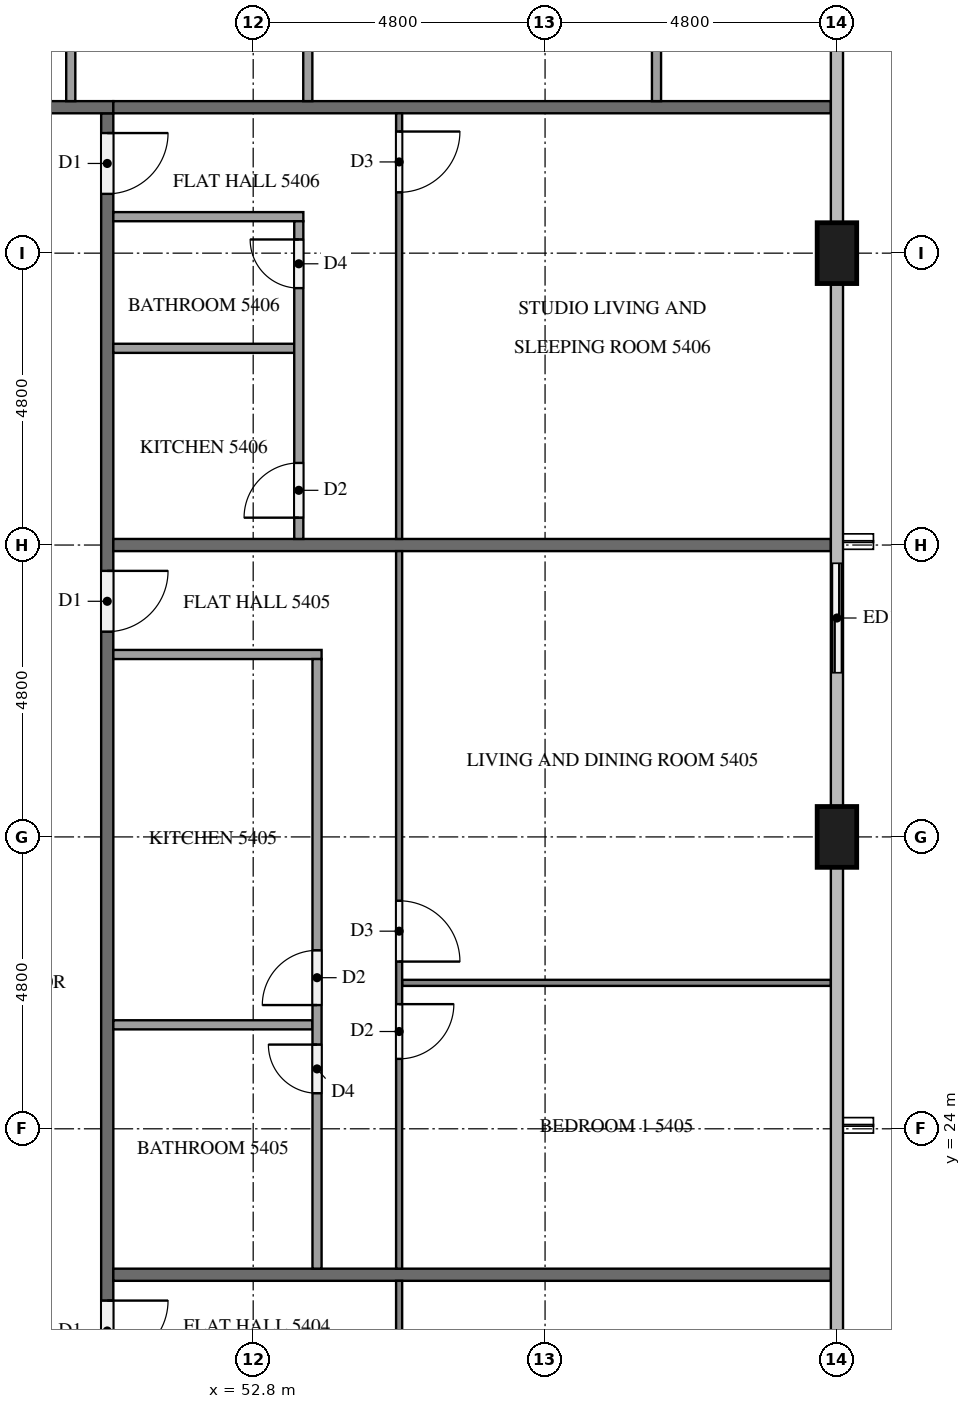
"""IFC4 building model, lengths in metres.
Left out: names, types, materials, properties, quantities, classifications, styles, units other than length and angle.
Written with IfcOpenShell. Run it as: python <this file> out.ifc"""

import sys

from ifc_helpers import new_model, si_unit, direction, frame, frame_2d, origin, origin_2d, place, context, subcontext, project, spatial, rectangle, extrude, element, fill, save


model = new_model("IFC4")
c1 = context("Model", 3, precision=1e-05, world=origin(), true_north=direction((0.0, 1.0)))
c2 = subcontext(c1, "Body", "Model", "MODEL_VIEW")
j1 = project(units=[si_unit("LENGTHUNIT", "METRE"), si_unit("PLANEANGLEUNIT", "RADIAN")], contexts=[c1])
p1 = place(None, origin())
s1 = spatial("IfcSite", under=j1, at=p1, CompositionType="ELEMENT")
p2 = place(p1, origin())
s2 = spatial("IfcBuilding", under=s1, at=p2, CompositionType="ELEMENT")
p3 = place(p2, frame((0.0, 0.0, 208.8)))
s3 = spatial("IfcBuildingStorey", under=s2, at=p3, CompositionType="ELEMENT", Elevation=208.8)
for number, where, z_axis, x_axis in (
    (1, (62.4, 28.8, 0.0), (0.0, 0.0, 1.0), (0.0, 1.0, 0.0)),
    (2, (62.4, 38.4, 0.0), (0.0, 0.0, 1.0), (0.0, 1.0, 0.0)),
):
    element("IfcColumn", number, at=place(p3, frame(where, z_axis=z_axis, x_axis=x_axis)), inside=s3, PredefinedType="COLUMN", context=c2, shape_type="SweptSolid", body=[
        extrude(rectangle(XDim=1.0, YDim=0.65, at=origin_2d()), origin(), (0.0, 0.0, 1.0), 3.2),
    ])
p4 = place(p3, frame((62.4, 31.2, 0.0), z_axis=(0.0, 0.0, 1.0), x_axis=(0.0, 1.0, 0.0)))
e3 = element("IfcWall", 3, at=p4, inside=s3, PredefinedType="SOLIDWALL", context=c2, shape_type="SweptSolid", body=[
    extrude(rectangle(XDim=2.4, YDim=0.15, at=frame_2d((1.2, 0.0))), origin(), (0.0, 0.0, 1.0), 3.2),
])
p5 = place(p4, frame((0.3, 0.0, 0.0)))
e4 = element("IfcOpeningElement", 4, at=p5, cuts=e3, PredefinedType="OPENING", context=c2, shape_type="SweptSolid", body=[
    extrude(rectangle(XDim=1.8, YDim=2.4, at=frame_2d((0.9, 1.2))), frame((0.0, 0.085, 0.0), z_axis=(0.0, -1.0, 0.0), x_axis=(1.0, 0.0, 0.0)), (0.0, 0.0, 1.0), 0.17),
])
p6 = place(p3, frame((50.4, 40.7, 0.0), z_axis=(0.0, 0.0, 1.0), x_axis=(0.0, -1.0, 0.0)))
e5 = element("IfcWall", 5, at=p6, inside=s3, PredefinedType="PARTITIONING", context=c2, shape_type="SweptSolid", body=[
    extrude(rectangle(XDim=28.6, YDim=0.2, at=frame_2d((14.3, 0.0))), origin(), (0.0, 0.0, 1.0), 3.2),
])
p7 = place(p6, frame((19.525, 0.0, 0.0)))
e6 = element("IfcOpeningElement", 6, at=p7, cuts=e5, PredefinedType="OPENING", context=c2, shape_type="SweptSolid", body=[
    extrude(rectangle(XDim=1.0, YDim=2.1, at=frame_2d((0.5, 1.05))), frame((0.0, 0.11, 0.0), z_axis=(0.0, -1.0, 0.0), x_axis=(1.0, 0.0, 0.0)), (0.0, 0.0, 1.0), 0.22),
])
p8 = place(p6, frame((7.525, 0.0, 0.0)))
e7 = element("IfcOpeningElement", 7, at=p8, cuts=e5, PredefinedType="OPENING", context=c2, shape_type="SweptSolid", body=[
    extrude(rectangle(XDim=1.0, YDim=2.1, at=frame_2d((0.5, 1.05))), frame((0.0, 0.11, 0.0), z_axis=(0.0, -1.0, 0.0), x_axis=(1.0, 0.0, 0.0)), (0.0, 0.0, 1.0), 0.22),
])
p9 = place(p6, frame((0.325, 0.0, 0.0)))
e8 = element("IfcOpeningElement", 8, at=p9, cuts=e5, PredefinedType="OPENING", context=c2, shape_type="SweptSolid", body=[
    extrude(rectangle(XDim=1.0, YDim=2.1, at=frame_2d((0.5, 1.05))), frame((0.0, 0.11, 0.0), z_axis=(0.0, -1.0, 0.0), x_axis=(1.0, 0.0, 0.0)), (0.0, 0.0, 1.0), 0.22),
])
p10 = place(p3, frame((11.9, 40.8, 0.0), z_axis=(0.0, 0.0, 1.0), x_axis=(1.0, 0.0, 0.0)))
e9 = element("IfcWall", 9, at=p10, inside=s3, PredefinedType="PARTITIONING", context=c2, shape_type="SweptSolid", body=[
    extrude(rectangle(XDim=38.6, YDim=0.2, at=frame_2d((19.3, 0.0))), origin(), (0.0, 0.0, 1.0), 3.2),
])
p11 = place(p10, frame((36.525, 0.0, 0.0)))
e10 = element("IfcOpeningElement", 10, at=p11, cuts=e9, PredefinedType="OPENING", context=c2, shape_type="SweptSolid", body=[
    extrude(rectangle(XDim=1.0, YDim=2.1, at=frame_2d((0.5, 1.05))), frame((0.0, 0.11, 0.0), z_axis=(0.0, -1.0, 0.0), x_axis=(1.0, 0.0, 0.0)), (0.0, 0.0, 1.0), 0.22),
])
p12 = place(p10, frame((29.325, 0.0, 0.0)))
e11 = element("IfcOpeningElement", 11, at=p12, cuts=e9, PredefinedType="OPENING", context=c2, shape_type="SweptSolid", body=[
    extrude(rectangle(XDim=1.0, YDim=2.1, at=frame_2d((0.5, 1.05))), frame((0.0, 0.11, 0.0), z_axis=(0.0, -1.0, 0.0), x_axis=(1.0, 0.0, 0.0)), (0.0, 0.0, 1.0), 0.22),
])
p13 = place(p10, frame((12.525, 0.0, 0.0)))
e12 = element("IfcOpeningElement", 12, at=p13, cuts=e9, PredefinedType="OPENING", context=c2, shape_type="SweptSolid", body=[
    extrude(rectangle(XDim=1.0, YDim=2.1, at=frame_2d((0.5, 1.05))), frame((0.0, 0.11, 0.0), z_axis=(0.0, -1.0, 0.0), x_axis=(1.0, 0.0, 0.0)), (0.0, 0.0, 1.0), 0.22),
])
p14 = place(p10, frame((10.625, 0.0, 0.0)))
e13 = element("IfcOpeningElement", 13, at=p14, cuts=e9, PredefinedType="OPENING", context=c2, shape_type="SweptSolid", body=[
    extrude(rectangle(XDim=1.1, YDim=2.1, at=frame_2d((0.55, 1.05))), frame((0.0, 0.11, 0.0), z_axis=(0.0, -1.0, 0.0), x_axis=(1.0, 0.0, 0.0)), (0.0, 0.0, 1.0), 0.22),
])
for number, where, z_axis, x_axis in (
    (14, (50.5, 21.6, 0.0), (0.0, 0.0, 1.0), (1.0, 0.0, 0.0)),
    (15, (50.5, 33.6, 0.0), (0.0, 0.0, 1.0), (1.0, 0.0, 0.0)),
    (16, (50.5, 40.8, 0.0), (0.0, 0.0, 1.0), (1.0, 0.0, 0.0)),
):
    element("IfcWall", number, at=place(p3, frame(where, z_axis=z_axis, x_axis=x_axis)), inside=s3, PredefinedType="PARTITIONING", context=c2, shape_type="SweptSolid", body=[
        extrude(rectangle(XDim=11.8, YDim=0.2, at=frame_2d((5.9, 0.0))), origin(), (0.0, 0.0, 1.0), 3.2),
    ])
p15 = place(p3, frame((55.2, 21.5, 0.0), z_axis=(0.0, 0.0, 1.0), x_axis=(0.0, -1.0, 0.0)))
e17 = element("IfcWall", 17, at=p15, inside=s3, PredefinedType="PARTITIONING", context=c2, shape_type="SweptSolid", body=[
    extrude(rectangle(XDim=16.6, YDim=0.1, at=frame_2d((8.3, 0.0))), origin(), (0.0, 0.0, 1.0), 3.2),
])
p16 = place(p15, frame((3.45, 0.0, 0.0)))
e18 = element("IfcOpeningElement", 18, at=p16, cuts=e17, PredefinedType="OPENING", context=c2, shape_type="SweptSolid", body=[
    extrude(rectangle(XDim=0.9, YDim=2.1, at=frame_2d((0.45, 1.05))), frame((0.0, 0.06, 0.0), z_axis=(0.0, -1.0, 0.0), x_axis=(1.0, 0.0, 0.0)), (0.0, 0.0, 1.0), 0.12),
])
p17 = place(p15, frame((5.05, 0.0, 0.0)))
e19 = element("IfcOpeningElement", 19, at=p17, cuts=e17, PredefinedType="OPENING", context=c2, shape_type="SweptSolid", body=[
    extrude(rectangle(XDim=0.9, YDim=2.1, at=frame_2d((0.45, 1.05))), frame((0.0, 0.06, 0.0), z_axis=(0.0, -1.0, 0.0), x_axis=(1.0, 0.0, 0.0)), (0.0, 0.0, 1.0), 0.12),
])
p18 = place(p15, frame((15.3, 0.0, 0.0)))
e20 = element("IfcOpeningElement", 20, at=p18, cuts=e17, PredefinedType="OPENING", context=c2, shape_type="SweptSolid", body=[
    extrude(rectangle(XDim=1.0, YDim=2.1, at=frame_2d((0.5, 1.05))), frame((0.0, 0.06, 0.0), z_axis=(0.0, -1.0, 0.0), x_axis=(1.0, 0.0, 0.0)), (0.0, 0.0, 1.0), 0.12),
])
p19 = place(p3, frame((55.25, 26.4, 0.0), z_axis=(0.0, 0.0, 1.0), x_axis=(1.0, 0.0, 0.0)))
e21 = element("IfcWall", 21, at=p19, inside=s3, PredefinedType="PARTITIONING", context=c2, shape_type="SweptSolid", body=[
    extrude(rectangle(XDim=7.05, YDim=0.1, at=frame_2d((3.525, 0.0))), origin(), (0.0, 0.0, 1.0), 3.2),
])
p20 = place(p3, frame((55.2, 33.5, 0.0), z_axis=(0.0, 0.0, 1.0), x_axis=(0.0, -1.0, 0.0)))
e22 = element("IfcWall", 22, at=p20, inside=s3, PredefinedType="PARTITIONING", context=c2, shape_type="SweptSolid", body=[
    extrude(rectangle(XDim=11.8, YDim=0.1, at=frame_2d((5.9, 0.0))), origin(), (0.0, 0.0, 1.0), 3.2),
])
p21 = place(p20, frame((5.75, 0.0, 0.0)))
e23 = element("IfcOpeningElement", 23, at=p21, cuts=e22, PredefinedType="OPENING", context=c2, shape_type="SweptSolid", body=[
    extrude(rectangle(XDim=1.0, YDim=2.1, at=frame_2d((0.5, 1.05))), frame((0.0, 0.06, 0.0), z_axis=(0.0, -1.0, 0.0), x_axis=(1.0, 0.0, 0.0)), (0.0, 0.0, 1.0), 0.12),
])
p22 = place(p20, frame((7.45, 0.0, 0.0)))
e24 = element("IfcOpeningElement", 24, at=p22, cuts=e22, PredefinedType="OPENING", context=c2, shape_type="SweptSolid", body=[
    extrude(rectangle(XDim=0.9, YDim=2.1, at=frame_2d((0.45, 1.05))), frame((0.0, 0.06, 0.0), z_axis=(0.0, -1.0, 0.0), x_axis=(1.0, 0.0, 0.0)), (0.0, 0.0, 1.0), 0.12),
])
p23 = place(p3, frame((50.5, 25.71, 0.0), z_axis=(0.0, 0.0, 1.0), x_axis=(1.0, 0.0, 0.0)))
e25 = element("IfcWall", 25, at=p23, inside=s3, PredefinedType="PARTITIONING", context=c2, shape_type="SweptSolid", body=[
    extrude(rectangle(XDim=3.275, YDim=0.15, at=frame_2d((1.637, 0.0))), origin(), (0.0, 0.0, 1.0), 3.2),
])
p24 = place(p3, frame((50.5, 31.8, 0.0), z_axis=(0.0, 0.0, 1.0), x_axis=(1.0, 0.0, 0.0)))
e26 = element("IfcWall", 26, at=p24, inside=s3, PredefinedType="PARTITIONING", context=c2, shape_type="SweptSolid", body=[
    extrude(rectangle(XDim=3.425, YDim=0.15, at=frame_2d((1.712, 0.0))), origin(), (0.0, 0.0, 1.0), 3.2),
])
p25 = place(p3, frame((53.85, 21.7, 0.0), z_axis=(0.0, 0.0, 1.0), x_axis=(0.0, 1.0, 0.0)))
e27 = element("IfcWall", 27, at=p25, inside=s3, PredefinedType="PARTITIONING", context=c2, shape_type="SweptSolid", body=[
    extrude(rectangle(XDim=10.025, YDim=0.15, at=frame_2d((5.013, 0.0))), origin(), (0.0, 0.0, 1.0), 3.2),
])
p26 = place(p25, frame((4.335, 0.0, 0.0)))
e28 = element("IfcOpeningElement", 28, at=p26, cuts=e27, PredefinedType="OPENING", context=c2, shape_type="SweptSolid", body=[
    extrude(rectangle(XDim=0.9, YDim=2.1, at=frame_2d((0.45, 1.05))), frame((0.0, 0.085, 0.0), z_axis=(0.0, -1.0, 0.0), x_axis=(1.0, 0.0, 0.0)), (0.0, 0.0, 1.0), 0.17),
])
p27 = place(p25, frame((2.885, 0.0, 0.0)))
e29 = element("IfcOpeningElement", 29, at=p27, cuts=e27, PredefinedType="OPENING", context=c2, shape_type="SweptSolid", body=[
    extrude(rectangle(XDim=0.8, YDim=2.1, at=frame_2d((0.4, 1.05))), frame((0.0, 0.085, 0.0), z_axis=(0.0, -1.0, 0.0), x_axis=(1.0, 0.0, 0.0)), (0.0, 0.0, 1.0), 0.17),
])
p28 = place(p3, frame((55.2, 40.7, 0.0), z_axis=(0.0, 0.0, 1.0), x_axis=(0.0, -1.0, 0.0)))
e30 = element("IfcWall", 30, at=p28, inside=s3, PredefinedType="PARTITIONING", context=c2, shape_type="SweptSolid", body=[
    extrude(rectangle(XDim=7.0, YDim=0.1, at=frame_2d((3.5, 0.0))), origin(), (0.0, 0.0, 1.0), 3.2),
])
p29 = place(p28, frame((0.3, 0.0, 0.0)))
e31 = element("IfcOpeningElement", 31, at=p29, cuts=e30, PredefinedType="OPENING", context=c2, shape_type="SweptSolid", body=[
    extrude(rectangle(XDim=1.0, YDim=2.1, at=frame_2d((0.5, 1.05))), frame((0.0, 0.06, 0.0), z_axis=(0.0, -1.0, 0.0), x_axis=(1.0, 0.0, 0.0)), (0.0, 0.0, 1.0), 0.12),
])
p30 = place(p3, frame((50.5, 36.835, 0.0), z_axis=(0.0, 0.0, 1.0), x_axis=(1.0, 0.0, 0.0)))
e32 = element("IfcWall", 32, at=p30, inside=s3, PredefinedType="PARTITIONING", context=c2, shape_type="SweptSolid", body=[
    extrude(rectangle(XDim=2.975, YDim=0.15, at=frame_2d((1.488, 0.0))), origin(), (0.0, 0.0, 1.0), 3.2),
])
p31 = place(p3, frame((50.5, 39.0, 0.0), z_axis=(0.0, 0.0, 1.0), x_axis=(1.0, 0.0, 0.0)))
e33 = element("IfcWall", 33, at=p31, inside=s3, PredefinedType="PARTITIONING", context=c2, shape_type="SweptSolid", body=[
    extrude(rectangle(XDim=3.125, YDim=0.15, at=frame_2d((1.562, 0.0))), origin(), (0.0, 0.0, 1.0), 3.2),
])
p32 = place(p3, frame((53.55, 33.7, 0.0), z_axis=(0.0, 0.0, 1.0), x_axis=(0.0, 1.0, 0.0)))
e34 = element("IfcWall", 34, at=p32, inside=s3, PredefinedType="PARTITIONING", context=c2, shape_type="SweptSolid", body=[
    extrude(rectangle(XDim=5.225, YDim=0.15, at=frame_2d((2.613, 0.0))), origin(), (0.0, 0.0, 1.0), 3.2),
])
p33 = place(p32, frame((4.125, 0.0, 0.0)))
e35 = element("IfcOpeningElement", 35, at=p33, cuts=e34, PredefinedType="OPENING", context=c2, shape_type="SweptSolid", body=[
    extrude(rectangle(XDim=0.8, YDim=2.1, at=frame_2d((0.4, 1.05))), frame((0.0, 0.085, 0.0), z_axis=(0.0, -1.0, 0.0), x_axis=(1.0, 0.0, 0.0)), (0.0, 0.0, 1.0), 0.17),
])
p34 = place(p32, frame((0.35, 0.0, 0.0)))
e36 = element("IfcOpeningElement", 36, at=p34, cuts=e34, PredefinedType="OPENING", context=c2, shape_type="SweptSolid", body=[
    extrude(rectangle(XDim=0.9, YDim=2.1, at=frame_2d((0.45, 1.05))), frame((0.0, 0.085, 0.0), z_axis=(0.0, -1.0, 0.0), x_axis=(1.0, 0.0, 0.0)), (0.0, 0.0, 1.0), 0.17),
])
for number, where, z_axis, x_axis in (
    (37, (53.698, 40.9, 0.0), (0.0, 0.0, 1.0), (0.0, 1.0, 0.0)),
    (38, (59.433, 40.9, 0.0), (0.0, 0.0, 1.0), (0.0, 1.0, 0.0)),
):
    element("IfcWall", number, at=place(p3, frame(where, z_axis=z_axis, x_axis=x_axis)), inside=s3, PredefinedType="PARTITIONING", context=c2, shape_type="SweptSolid", body=[
        extrude(rectangle(XDim=3.275, YDim=0.15, at=frame_2d((1.638, 0.0))), origin(), (0.0, 0.0, 1.0), 3.2),
    ])
p35 = place(p3, frame((49.8, 40.9, 0.0), z_axis=(0.0, 0.0, 1.0), x_axis=(0.0, 1.0, 0.0)))
e39 = element("IfcWall", 39, at=p35, inside=s3, PredefinedType="PARTITIONING", context=c2, shape_type="SweptSolid", body=[
    extrude(rectangle(XDim=3.425, YDim=0.15, at=frame_2d((1.712, 0.0))), origin(), (0.0, 0.0, 1.0), 3.2),
])
p36 = place(p5, origin())
e40 = element("IfcDoor", 40, at=p36, inside=s3, OperationType="SLIDING_TO_RIGHT", PredefinedType="DOOR", context=c2, shape_type="SweptSolid", body=[
    extrude(rectangle(XDim=1.8, YDim=2.4, at=frame_2d((0.9, 1.2))), frame((0.0, 0.025, 0.0), z_axis=(0.0, -1.0, 0.0), x_axis=(1.0, 0.0, 0.0)), (0.0, 0.0, 1.0), 0.05),
])
fill(e4, e40)
p37 = place(p7, origin())
e41 = element("IfcDoor", 41, at=p37, inside=s3, OperationType="SINGLE_SWING_LEFT", PredefinedType="DOOR", context=c2, shape_type="SweptSolid", body=[
    extrude(rectangle(XDim=1.0, YDim=2.1, at=frame_2d((0.5, 1.05))), frame((0.0, 0.025, 0.0), z_axis=(0.0, -1.0, 0.0), x_axis=(1.0, 0.0, 0.0)), (0.0, 0.0, 1.0), 0.05),
])
fill(e6, e41)
p38 = place(p8, origin())
e42 = element("IfcDoor", 42, at=p38, inside=s3, OperationType="SINGLE_SWING_LEFT", PredefinedType="DOOR", context=c2, shape_type="SweptSolid", body=[
    extrude(rectangle(XDim=1.0, YDim=2.1, at=frame_2d((0.5, 1.05))), frame((0.0, 0.025, 0.0), z_axis=(0.0, -1.0, 0.0), x_axis=(1.0, 0.0, 0.0)), (0.0, 0.0, 1.0), 0.05),
])
fill(e7, e42)
p39 = place(p9, origin())
e43 = element("IfcDoor", 43, at=p39, inside=s3, OperationType="SINGLE_SWING_LEFT", PredefinedType="DOOR", context=c2, shape_type="SweptSolid", body=[
    extrude(rectangle(XDim=1.0, YDim=2.1, at=frame_2d((0.5, 1.05))), frame((0.0, 0.025, 0.0), z_axis=(0.0, -1.0, 0.0), x_axis=(1.0, 0.0, 0.0)), (0.0, 0.0, 1.0), 0.05),
])
fill(e8, e43)
p40 = place(p21, origin())
e44 = element("IfcDoor", 44, at=p40, inside=s3, OperationType="SINGLE_SWING_RIGHT", PredefinedType="DOOR", context=c2, shape_type="SweptSolid", body=[
    extrude(rectangle(XDim=1.0, YDim=2.1, at=frame_2d((0.5, 1.05))), frame((0.0, 0.025, 0.0), z_axis=(0.0, -1.0, 0.0), x_axis=(1.0, 0.0, 0.0)), (0.0, 0.0, 1.0), 0.05),
])
fill(e23, e44)
p41 = place(p22, origin())
e45 = element("IfcDoor", 45, at=p41, inside=s3, OperationType="SINGLE_SWING_LEFT", PredefinedType="DOOR", context=c2, shape_type="SweptSolid", body=[
    extrude(rectangle(XDim=0.9, YDim=2.1, at=frame_2d((0.45, 1.05))), frame((0.0, 0.025, 0.0), z_axis=(0.0, -1.0, 0.0), x_axis=(1.0, 0.0, 0.0)), (0.0, 0.0, 1.0), 0.05),
])
fill(e24, e45)
p42 = place(p26, origin())
e46 = element("IfcDoor", 46, at=p42, inside=s3, OperationType="SINGLE_SWING_LEFT", PredefinedType="DOOR", context=c2, shape_type="SweptSolid", body=[
    extrude(rectangle(XDim=0.9, YDim=2.1, at=frame_2d((0.45, 1.05))), frame((0.0, 0.025, 0.0), z_axis=(0.0, -1.0, 0.0), x_axis=(1.0, 0.0, 0.0)), (0.0, 0.0, 1.0), 0.05),
])
fill(e28, e46)
p43 = place(p27, origin())
e47 = element("IfcDoor", 47, at=p43, inside=s3, OperationType="SINGLE_SWING_RIGHT", PredefinedType="DOOR", context=c2, shape_type="SweptSolid", body=[
    extrude(rectangle(XDim=0.8, YDim=2.1, at=frame_2d((0.4, 1.05))), frame((0.0, 0.025, 0.0), z_axis=(0.0, -1.0, 0.0), x_axis=(1.0, 0.0, 0.0)), (0.0, 0.0, 1.0), 0.05),
])
fill(e29, e47)
p44 = place(p29, origin())
e48 = element("IfcDoor", 48, at=p44, inside=s3, OperationType="SINGLE_SWING_LEFT", PredefinedType="DOOR", context=c2, shape_type="SweptSolid", body=[
    extrude(rectangle(XDim=1.0, YDim=2.1, at=frame_2d((0.5, 1.05))), frame((0.0, 0.025, 0.0), z_axis=(0.0, -1.0, 0.0), x_axis=(1.0, 0.0, 0.0)), (0.0, 0.0, 1.0), 0.05),
])
fill(e31, e48)
p45 = place(p33, origin())
e49 = element("IfcDoor", 49, at=p45, inside=s3, OperationType="SINGLE_SWING_RIGHT", PredefinedType="DOOR", context=c2, shape_type="SweptSolid", body=[
    extrude(rectangle(XDim=0.8, YDim=2.1, at=frame_2d((0.4, 1.05))), frame((0.0, 0.025, 0.0), z_axis=(0.0, -1.0, 0.0), x_axis=(1.0, 0.0, 0.0)), (0.0, 0.0, 1.0), 0.05),
])
fill(e35, e49)
p46 = place(p34, origin())
e50 = element("IfcDoor", 50, at=p46, inside=s3, OperationType="SINGLE_SWING_LEFT", PredefinedType="DOOR", context=c2, shape_type="SweptSolid", body=[
    extrude(rectangle(XDim=0.9, YDim=2.1, at=frame_2d((0.45, 1.05))), frame((0.0, 0.025, 0.0), z_axis=(0.0, -1.0, 0.0), x_axis=(1.0, 0.0, 0.0)), (0.0, 0.0, 1.0), 0.05),
])
fill(e36, e50)
save(model, sys.argv[1])
